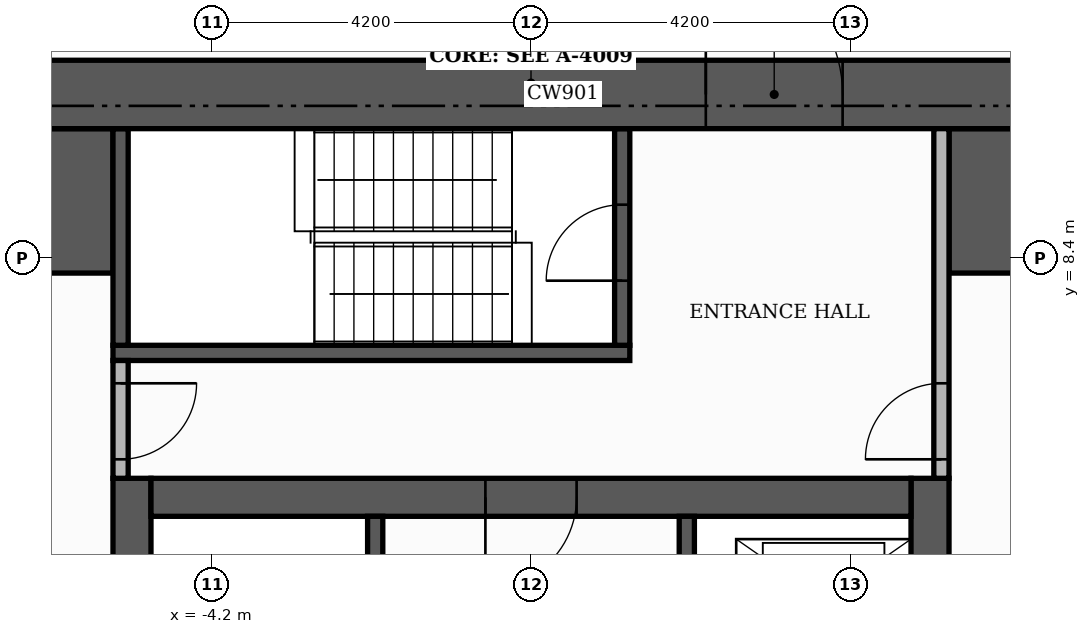
"""IFC4 building model, lengths in metres.
Left out: names, types, materials, properties, quantities, classifications, styles, units other than length and angle.
Written with IfcOpenShell. Run it as: python <this file> out.ifc"""

import sys

from ifc_helpers import new_model, si_unit, direction, frame, frame_2d, origin, place, context, subcontext, project, spatial, rectangle, extrude, element, fill, save


model = new_model("IFC4")
c1 = context("Model", 3, precision=1e-05, world=origin(), true_north=direction((0.0, 1.0)))
c2 = subcontext(c1, "Body", "Model", "MODEL_VIEW")
j1 = project(units=[si_unit("LENGTHUNIT", "METRE"), si_unit("PLANEANGLEUNIT", "RADIAN")], contexts=[c1])
p1 = place(None, origin())
s1 = spatial("IfcSite", under=j1, at=p1, CompositionType="ELEMENT")
p2 = place(p1, origin())
s2 = spatial("IfcBuilding", under=s1, at=p2, CompositionType="ELEMENT")
p3 = place(p2, frame((0.0, 0.0, 38.7)))
s3 = spatial("IfcBuildingStorey", under=s2, at=p3, CompositionType="ELEMENT", Elevation=38.7)
for number, where, z_axis, x_axis in (
    (1, (-5.25, -5.0, 0.0), (0.0, 0.0, 1.0), (0.0, 1.0, 0.0)),
    (2, (5.25, -5.0, 0.0), (0.0, 0.0, 1.0), (0.0, 1.0, 0.0)),
):
    element("IfcWall", number, at=place(p3, frame(where, z_axis=z_axis, x_axis=x_axis)), inside=s3, PredefinedType="SHEAR", context=c2, shape_type="SweptSolid", body=[
        extrude(rectangle(XDim=10.5, YDim=0.5, at=frame_2d((5.25, 0.0))), origin(), (0.0, 0.0, 1.0), 3.48),
    ])
p4 = place(p3, frame((-5.0, 5.25, 0.0), z_axis=(0.0, 0.0, 1.0), x_axis=(1.0, 0.0, 0.0)))
e3 = element("IfcWall", 3, at=p4, inside=s3, PredefinedType="SHEAR", context=c2, shape_type="SweptSolid", body=[
    extrude(rectangle(XDim=10.0, YDim=0.5, at=frame_2d((5.0, 0.0))), origin(), (0.0, 0.0, 1.0), 3.48),
])
p5 = place(p4, frame((4.4, 0.0, 0.0)))
e4 = element("IfcOpeningElement", 4, at=p5, cuts=e3, PredefinedType="OPENING", context=c2, shape_type="SweptSolid", body=[
    extrude(rectangle(XDim=1.2, YDim=2.1, at=frame_2d((0.6, 1.05))), frame((0.0, 0.26, 0.0), z_axis=(0.0, -1.0, 0.0), x_axis=(1.0, 0.0, 0.0)), (0.0, 0.0, 1.0), 0.52),
])
for number, where, z_axis, x_axis in (
    (5, (-10.1, 9.15, 0.0), (0.0, 0.0, 1.0), (1.0, 0.0, 0.0)),
    (6, (5.5, 9.15, 0.0), (0.0, 0.0, 1.0), (1.0, 0.0, 0.0)),
):
    element("IfcWall", number, at=place(p3, frame(where, z_axis=z_axis, x_axis=x_axis)), inside=s3, PredefinedType="SHEAR", context=c2, shape_type="SweptSolid", body=[
        extrude(rectangle(XDim=4.6, YDim=1.9, at=frame_2d((2.3, 0.0))), origin(), (0.0, 0.0, 1.0), 3.48),
    ])
p6 = place(p3, frame((-2.05, -1.4, 0.0), z_axis=(0.0, 0.0, 1.0), x_axis=(0.0, 1.0, 0.0)))
e7 = element("IfcWall", 7, at=p6, inside=s3, PredefinedType="SHEAR", context=c2, shape_type="SweptSolid", body=[
    extrude(rectangle(XDim=6.4, YDim=0.2, at=frame_2d((3.2, 0.0))), origin(), (0.0, 0.0, 1.0), 3.48),
])
p7 = place(p6, frame((0.15, 0.0, 0.0)))
e8 = element("IfcOpeningElement", 8, at=p7, cuts=e7, PredefinedType="OPENING", context=c2, shape_type="SweptSolid", body=[
    extrude(rectangle(XDim=1.0, YDim=2.1, at=frame_2d((0.5, 1.05))), frame((0.0, 0.11, 0.0), z_axis=(0.0, -1.0, 0.0), x_axis=(1.0, 0.0, 0.0)), (0.0, 0.0, 1.0), 0.22),
])
p8 = place(p3, frame((-5.5, 7.15, 0.0), z_axis=(0.0, 0.0, 1.0), x_axis=(1.0, 0.0, 0.0)))
e9 = element("IfcWall", 9, at=p8, inside=s3, PredefinedType="SHEAR", context=c2, shape_type="SweptSolid", body=[
    extrude(rectangle(XDim=6.8, YDim=0.2, at=frame_2d((3.4, 0.0))), origin(), (0.0, 0.0, 1.0), 3.48),
])
p9 = place(p3, frame((-5.4, 7.25, 0.0), z_axis=(0.0, 0.0, 1.0), x_axis=(0.0, 1.0, 0.0)))
e10 = element("IfcWall", 10, at=p9, inside=s3, PredefinedType="SHEAR", context=c2, shape_type="SweptSolid", body=[
    extrude(rectangle(XDim=2.85, YDim=0.2, at=frame_2d((1.425, 0.0))), origin(), (0.0, 0.0, 1.0), 3.48),
])
p10 = place(p3, frame((1.2, 7.25, 0.0), z_axis=(0.0, 0.0, 1.0), x_axis=(0.0, 1.0, 0.0)))
e11 = element("IfcWall", 11, at=p10, inside=s3, PredefinedType="SHEAR", context=c2, shape_type="SweptSolid", body=[
    extrude(rectangle(XDim=2.85, YDim=0.2, at=frame_2d((1.425, 0.0))), origin(), (0.0, 0.0, 1.0), 3.48),
])
p11 = place(p10, frame((0.85, 0.0, 0.0)))
e12 = element("IfcOpeningElement", 12, at=p11, cuts=e11, PredefinedType="OPENING", context=c2, shape_type="SweptSolid", body=[
    extrude(rectangle(XDim=1.0, YDim=2.1, at=frame_2d((0.5, 1.05))), frame((0.0, 0.11, 0.0), z_axis=(0.0, -1.0, 0.0), x_axis=(1.0, 0.0, 0.0)), (0.0, 0.0, 1.0), 0.22),
])
p12 = place(p3, frame((2.05, 1.6, 0.0), z_axis=(0.0, 0.0, 1.0), x_axis=(0.0, 1.0, 0.0)))
e13 = element("IfcWall", 13, at=p12, inside=s3, PredefinedType="SHEAR", context=c2, shape_type="SweptSolid", body=[
    extrude(rectangle(XDim=3.4, YDim=0.2, at=frame_2d((1.7, 0.0))), origin(), (0.0, 0.0, 1.0), 3.48),
])
p13 = place(p12, frame((1.75, 0.0, 0.0)))
e14 = element("IfcOpeningElement", 14, at=p13, cuts=e13, PredefinedType="OPENING", context=c2, shape_type="SweptSolid", body=[
    extrude(rectangle(XDim=1.1, YDim=2.1, at=frame_2d((0.55, 1.05))), frame((0.0, 0.11, 0.0), z_axis=(0.0, -1.0, 0.0), x_axis=(1.0, 0.0, 0.0)), (0.0, 0.0, 1.0), 0.22),
])
p14 = place(p12, frame((0.15, 0.0, 0.0)))
e15 = element("IfcOpeningElement", 15, at=p14, cuts=e13, PredefinedType="OPENING", context=c2, shape_type="SweptSolid", body=[
    extrude(rectangle(XDim=0.8, YDim=2.1, at=frame_2d((0.4, 1.05))), frame((0.0, 0.11, 0.0), z_axis=(0.0, -1.0, 0.0), x_axis=(1.0, 0.0, 0.0)), (0.0, 0.0, 1.0), 0.22),
])
p15 = place(p3, frame((-11.0, 10.55, 0.0), z_axis=(0.0, 0.0, 1.0), x_axis=(1.0, 0.0, 0.0)))
e16 = element("IfcWall", 16, at=p15, inside=s3, PredefinedType="SHEAR", context=c2, shape_type="SweptSolid", body=[
    extrude(rectangle(XDim=22.0, YDim=0.9, at=frame_2d((11.0, 0.0))), origin(), (0.0, 0.0, 1.0), 3.48),
])
p16 = place(p15, frame((13.3, 0.0, 0.0)))
e17 = element("IfcOpeningElement", 17, at=p16, cuts=e16, PredefinedType="OPENING", context=c2, shape_type="SweptSolid", body=[
    extrude(rectangle(XDim=1.8, YDim=2.2, at=frame_2d((0.9, 1.1))), frame((0.0, 0.46, 0.0), z_axis=(0.0, -1.0, 0.0), x_axis=(1.0, 0.0, 0.0)), (0.0, 0.0, 1.0), 0.92),
])
p17 = place(p3, frame((-5.4, 5.5, 0.0), z_axis=(0.0, 0.0, 1.0), x_axis=(0.0, 1.0, 0.0)))
e18 = element("IfcWall", 18, at=p17, inside=s3, PredefinedType="PARTITIONING", context=c2, shape_type="SweptSolid", body=[
    extrude(rectangle(XDim=1.55, YDim=0.2, at=frame_2d((0.775, 0.0))), origin(), (0.0, 0.0, 1.0), 3.48),
])
p18 = place(p17, frame((0.25, 0.0, 0.0)))
e19 = element("IfcOpeningElement", 19, at=p18, cuts=e18, PredefinedType="OPENING", context=c2, shape_type="SweptSolid", body=[
    extrude(rectangle(XDim=1.0, YDim=2.1, at=frame_2d((0.5, 1.05))), frame((0.0, 0.11, 0.0), z_axis=(0.0, -1.0, 0.0), x_axis=(1.0, 0.0, 0.0)), (0.0, 0.0, 1.0), 0.22),
])
p19 = place(p3, frame((5.4, 5.5, 0.0), z_axis=(0.0, 0.0, 1.0), x_axis=(0.0, 1.0, 0.0)))
e20 = element("IfcWall", 20, at=p19, inside=s3, PredefinedType="PARTITIONING", context=c2, shape_type="SweptSolid", body=[
    extrude(rectangle(XDim=4.6, YDim=0.2, at=frame_2d((2.3, 0.0))), origin(), (0.0, 0.0, 1.0), 3.48),
])
p20 = place(p19, frame((0.25, 0.0, 0.0)))
e21 = element("IfcOpeningElement", 21, at=p20, cuts=e20, PredefinedType="OPENING", context=c2, shape_type="SweptSolid", body=[
    extrude(rectangle(XDim=1.0, YDim=2.1, at=frame_2d((0.5, 1.05))), frame((0.0, 0.11, 0.0), z_axis=(0.0, -1.0, 0.0), x_axis=(1.0, 0.0, 0.0)), (0.0, 0.0, 1.0), 0.22),
])
p21 = place(p5, frame((1.2, 0.0, 0.0), z_axis=(0.0, 0.0, 1.0), x_axis=(-1.0, 0.0, 0.0)))
e22 = element("IfcDoor", 22, at=p21, inside=s3, OperationType="SINGLE_SWING_LEFT", PredefinedType="DOOR", context=c2, shape_type="SweptSolid", body=[
    extrude(rectangle(XDim=1.2, YDim=2.1, at=frame_2d((0.6, 1.05))), frame((0.0, 0.025, 0.0), z_axis=(0.0, -1.0, 0.0), x_axis=(1.0, 0.0, 0.0)), (0.0, 0.0, 1.0), 0.05),
])
fill(e4, e22)
p22 = place(p11, origin())
e23 = element("IfcDoor", 23, at=p22, inside=s3, OperationType="SINGLE_SWING_LEFT", PredefinedType="DOOR", context=c2, shape_type="SweptSolid", body=[
    extrude(rectangle(XDim=1.0, YDim=2.1, at=frame_2d((0.5, 1.05))), frame((0.0, 0.025, 0.0), z_axis=(0.0, -1.0, 0.0), x_axis=(1.0, 0.0, 0.0)), (0.0, 0.0, 1.0), 0.05),
])
fill(e12, e23)
p23 = place(p18, frame((1.0, 0.0, 0.0), z_axis=(0.0, 0.0, 1.0), x_axis=(-1.0, 0.0, 0.0)))
e24 = element("IfcDoor", 24, at=p23, inside=s3, OperationType="SINGLE_SWING_RIGHT", PredefinedType="DOOR", context=c2, shape_type="SweptSolid", body=[
    extrude(rectangle(XDim=1.0, YDim=2.1, at=frame_2d((0.5, 1.05))), frame((0.0, 0.025, 0.0), z_axis=(0.0, -1.0, 0.0), x_axis=(1.0, 0.0, 0.0)), (0.0, 0.0, 1.0), 0.05),
])
fill(e19, e24)
p24 = place(p20, origin())
e25 = element("IfcDoor", 25, at=p24, inside=s3, OperationType="SINGLE_SWING_LEFT", PredefinedType="DOOR", context=c2, shape_type="SweptSolid", body=[
    extrude(rectangle(XDim=1.0, YDim=2.1, at=frame_2d((0.5, 1.05))), frame((0.0, 0.025, 0.0), z_axis=(0.0, -1.0, 0.0), x_axis=(1.0, 0.0, 0.0)), (0.0, 0.0, 1.0), 0.05),
])
fill(e21, e25)
p25 = place(p16, origin())
e26 = element("IfcDoor", 26, at=p25, inside=s3, OperationType="DOUBLE_DOOR_SINGLE_SWING", PredefinedType="DOOR", context=c2, shape_type="SweptSolid", body=[
    extrude(rectangle(XDim=1.8, YDim=2.2, at=frame_2d((0.9, 1.1))), frame((0.0, 0.025, 0.0), z_axis=(0.0, -1.0, 0.0), x_axis=(1.0, 0.0, 0.0)), (0.0, 0.0, 1.0), 0.05),
])
fill(e17, e26)
save(model, sys.argv[1])
